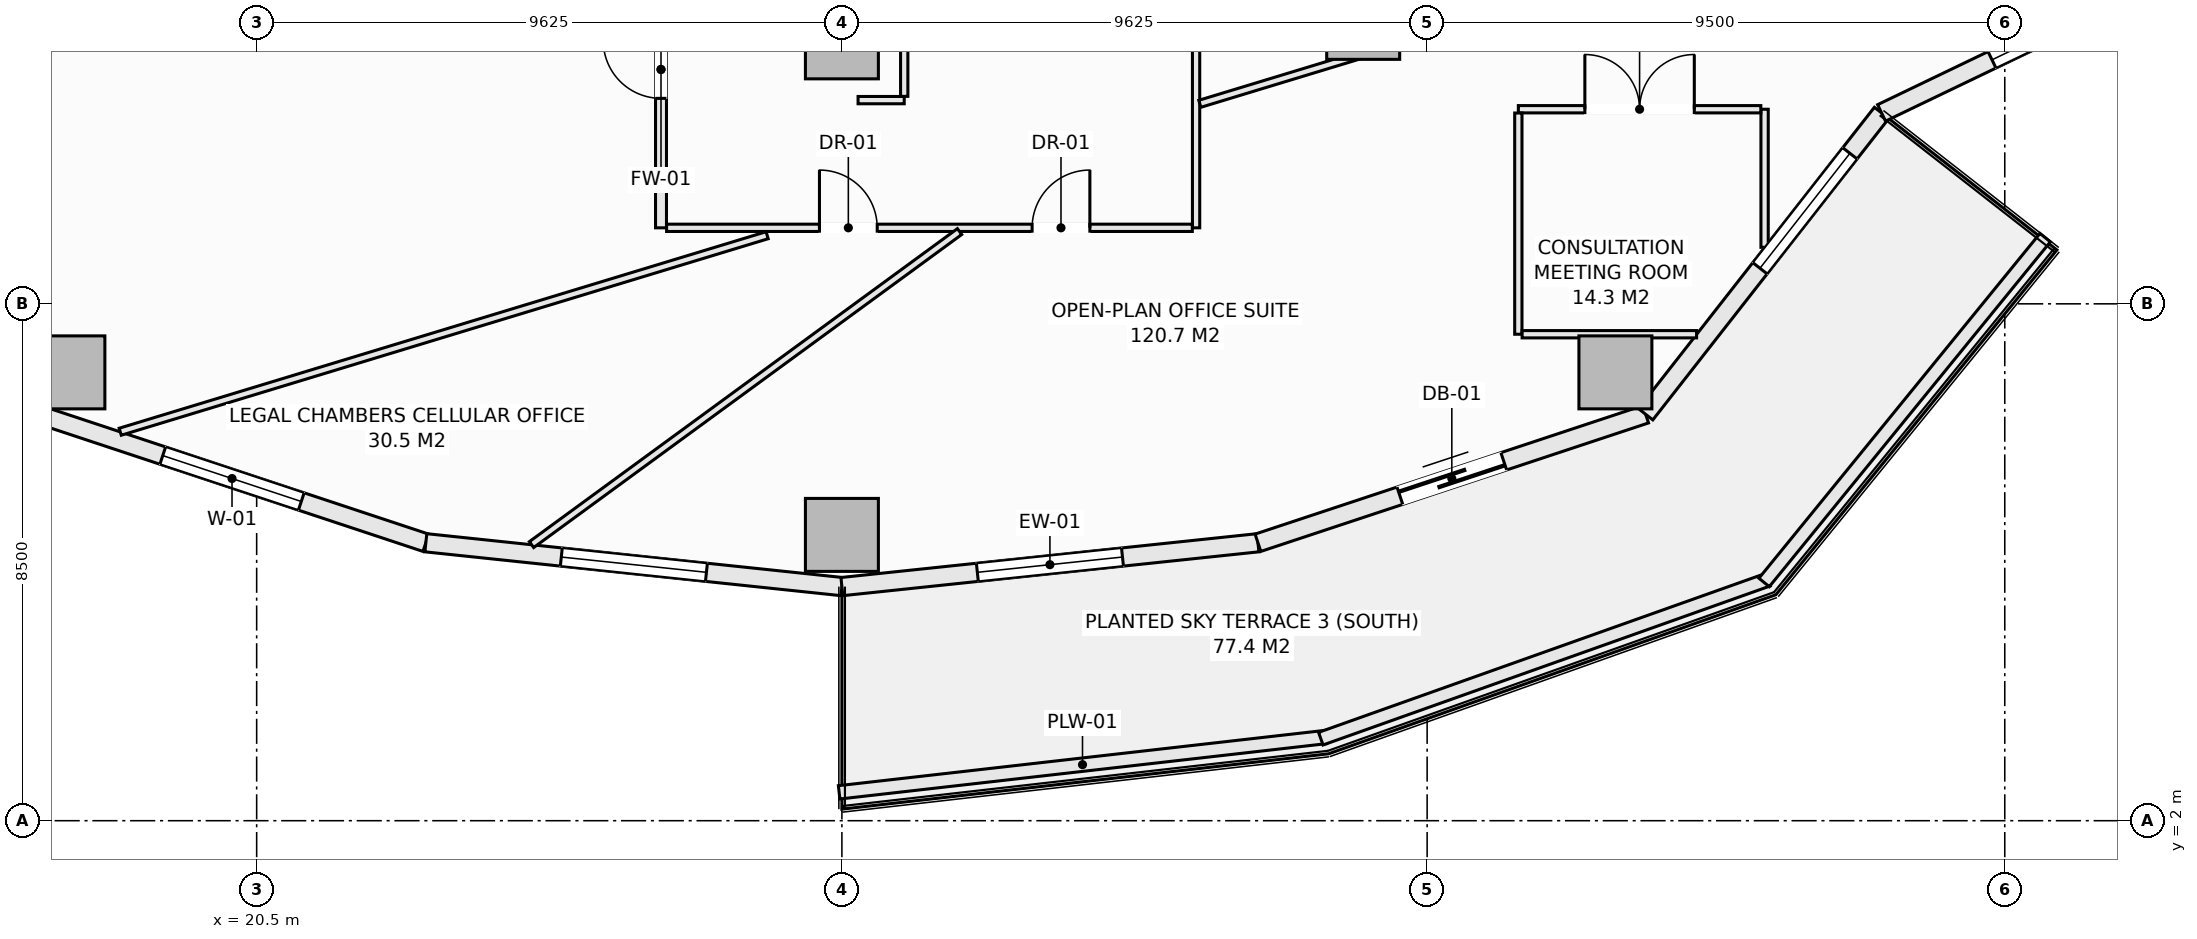
"""IFC4 building model, lengths in metres.
Left out: names, types, materials, properties, quantities, classifications, styles, units other than length and angle.
Written with IfcOpenShell. Run it as: python <this file> out.ifc"""

import sys

from ifc_helpers import new_model, si_unit, direction, frame, frame_2d, origin, origin_2d, place, context, subcontext, project, spatial, rectangle, extrude, element, fill, save


model = new_model("IFC4")
c1 = context("Model", 3, precision=1e-05, world=origin(), true_north=direction((0.0, 1.0)))
c2 = subcontext(c1, "Body", "Model", "MODEL_VIEW")
j1 = project(units=[si_unit("LENGTHUNIT", "METRE"), si_unit("PLANEANGLEUNIT", "RADIAN")], contexts=[c1])
p1 = place(None, origin())
s1 = spatial("IfcSite", under=j1, at=p1, CompositionType="ELEMENT")
p2 = place(p1, origin())
s2 = spatial("IfcBuilding", under=s1, at=p2, CompositionType="ELEMENT")
p3 = place(p2, frame((0.0, 0.0, 72.7)))
s3 = spatial("IfcBuildingStorey", under=s2, at=p3, CompositionType="ELEMENT", Elevation=72.7)
for number, where, z_axis, x_axis in (
    (1, (17.404, 9.373, -0.28), (0.0, 0.0, 1.0), (1.0, 0.0, 0.0)),
    (2, (30.125, 6.7, -0.28), (0.0, 0.0, 1.0), (1.0, 0.0, 0.0)),
    (3, (42.846, 9.373, -0.28), (0.0, 0.0, 1.0), (1.0, 0.0, 0.0)),
    (4, (30.125, 14.8, -0.28), (0.0, 0.0, 1.0), (1.0, 0.0, 0.0)),
    (5, (38.698, 15.121, -0.28), (0.0, 0.0, 1.0), (1.0, 0.0, 0.0)),
):
    element("IfcColumn", number, at=place(p3, frame(where, z_axis=z_axis, x_axis=x_axis)), inside=s3, PredefinedType="COLUMN", context=c2, shape_type="SweptSolid", body=[
        extrude(rectangle(XDim=1.2, YDim=1.2, at=origin_2d()), origin(), (0.0, 0.0, 1.0), 3.85),
    ])
p4 = place(p3, frame((16.906, 8.684, 0.0), z_axis=(0.0, 0.0, 1.0), x_axis=(0.949245153629, -0.314537181127, 0.0)))
e6 = element("IfcWall", 6, at=p4, inside=s3, PredefinedType="SOLIDWALL", context=c2, shape_type="SweptSolid", body=[
    extrude(rectangle(XDim=6.717, YDim=0.3, at=frame_2d((3.358, 0.0))), origin(), (0.0, 0.0, 1.0), 3.093),
])
p5 = place(p4, frame((2.159, 0.0, 0.85)))
e7 = element("IfcOpeningElement", 7, at=p5, cuts=e6, PredefinedType="OPENING", context=c2, shape_type="SweptSolid", body=[
    extrude(rectangle(XDim=2.4, YDim=1.9, at=frame_2d((1.2, 0.95))), frame((0.0, 0.16, 0.0), z_axis=(0.0, -1.0, 0.0), x_axis=(1.0, 0.0, 0.0)), (0.0, 0.0, 1.0), 0.32),
])
p6 = place(p3, frame((23.282, 6.571, 0.0), z_axis=(0.0, 0.0, 1.0), x_axis=(0.994498840295, -0.104747585419, 0.0)))
e8 = element("IfcWall", 8, at=p6, inside=s3, PredefinedType="SOLIDWALL", context=c2, shape_type="SweptSolid", body=[
    extrude(rectangle(XDim=6.88, YDim=0.3, at=frame_2d((3.44, 0.0))), origin(), (0.0, 0.0, 1.0), 3.093),
])
p7 = place(p6, frame((2.24, 0.0, 0.85)))
e9 = element("IfcOpeningElement", 9, at=p7, cuts=e8, PredefinedType="OPENING", context=c2, shape_type="SweptSolid", body=[
    extrude(rectangle(XDim=2.4, YDim=1.9, at=frame_2d((1.2, 0.95))), frame((0.0, 0.16, 0.0), z_axis=(0.0, -1.0, 0.0), x_axis=(1.0, 0.0, 0.0)), (0.0, 0.0, 1.0), 0.32),
])
p8 = place(p3, frame((30.125, 5.85, 0.0), z_axis=(0.0, 0.0, 1.0), x_axis=(0.994498840295, 0.104747585419, 0.0)))
e10 = element("IfcWall", 10, at=p8, inside=s3, PredefinedType="SOLIDWALL", context=c2, shape_type="SweptSolid", body=[
    extrude(rectangle(XDim=6.88, YDim=0.3, at=frame_2d((3.44, 0.0))), origin(), (0.0, 0.0, 1.0), 3.093),
])
p9 = place(p8, frame((2.24, 0.0, 0.85)))
e11 = element("IfcOpeningElement", 11, at=p9, cuts=e10, PredefinedType="OPENING", context=c2, shape_type="SweptSolid", body=[
    extrude(rectangle(XDim=2.4, YDim=1.9, at=frame_2d((1.2, 0.95))), frame((0.0, 0.16, 0.0), z_axis=(0.0, -1.0, 0.0), x_axis=(1.0, 0.0, 0.0)), (0.0, 0.0, 1.0), 0.32),
])
p10 = place(p3, frame((36.968, 6.571, 0.0), z_axis=(0.0, 0.0, 1.0), x_axis=(0.949245153629, 0.314537181127, 0.0)))
e12 = element("IfcWall", 12, at=p10, inside=s3, PredefinedType="SOLIDWALL", context=c2, shape_type="SweptSolid", body=[
    extrude(rectangle(XDim=6.717, YDim=0.3, at=frame_2d((3.358, 0.0))), origin(), (0.0, 0.0, 1.0), 3.093),
])
p11 = place(p10, frame((2.459, 0.0, 0.0)))
e13 = element("IfcOpeningElement", 13, at=p11, cuts=e12, PredefinedType="OPENING", context=c2, shape_type="SweptSolid", body=[
    extrude(rectangle(XDim=1.8, YDim=2.25, at=frame_2d((0.9, 1.125))), frame((0.0, 0.16, 0.0), z_axis=(0.0, -1.0, 0.0), x_axis=(1.0, 0.0, 0.0)), (0.0, 0.0, 1.0), 0.32),
])
p12 = place(p3, frame((43.344, 8.684, 0.0), z_axis=(0.0, 0.0, 1.0), x_axis=(0.616434798832, 0.78740595552, 0.0)))
e14 = element("IfcWall", 14, at=p12, inside=s3, PredefinedType="SOLIDWALL", context=c2, shape_type="SweptSolid", body=[
    extrude(rectangle(XDim=6.294, YDim=0.3, at=frame_2d((3.147, 0.0))), origin(), (0.0, 0.0, 1.0), 3.093),
])
p13 = place(p12, frame((3.05, 0.0, 0.85)))
e15 = element("IfcOpeningElement", 15, at=p13, cuts=e14, PredefinedType="OPENING", context=c2, shape_type="SweptSolid", body=[
    extrude(rectangle(XDim=2.4, YDim=1.9, at=frame_2d((1.2, 0.95))), frame((0.0, 0.16, 0.0), z_axis=(0.0, -1.0, 0.0), x_axis=(1.0, 0.0, 0.0)), (0.0, 0.0, 1.0), 0.32),
])
p14 = place(p3, frame((47.224, 13.64, 0.0), z_axis=(0.0, 0.0, 1.0), x_axis=(0.901354747727, 0.433081538224, 0.0)))
e16 = element("IfcWall", 16, at=p14, inside=s3, PredefinedType="SOLIDWALL", context=c2, shape_type="SweptSolid", body=[
    extrude(rectangle(XDim=6.431, YDim=0.3, at=frame_2d((3.215, 0.0))), origin(), (0.0, 0.0, 1.0), 3.093),
])
p15 = place(p14, frame((2.015, 0.0, 0.85)))
e17 = element("IfcOpeningElement", 17, at=p15, cuts=e16, PredefinedType="OPENING", context=c2, shape_type="SweptSolid", body=[
    extrude(rectangle(XDim=2.4, YDim=1.9, at=frame_2d((1.2, 0.95))), frame((0.0, 0.16, 0.0), z_axis=(0.0, -1.0, 0.0), x_axis=(1.0, 0.0, 0.0)), (0.0, 0.0, 1.0), 0.32),
])
p16 = place(p3, frame((30.08, 2.466, 0.0), z_axis=(0.0, 0.0, 1.0), x_axis=(0.993598144351, 0.112972242349, 0.0)))
e18 = element("IfcWall", 18, at=p16, inside=s3, PredefinedType="PARAPET", context=c2, shape_type="SweptSolid", body=[
    extrude(rectangle(XDim=8.056, YDim=0.22, at=frame_2d((4.028, 0.0))), origin(), (0.0, 0.0, 1.0), 0.52),
])
p17 = place(p3, frame((38.001, 3.349, 0.0), z_axis=(0.0, 0.0, 1.0), x_axis=(0.942203722205, 0.335040513764, 0.0)))
e19 = element("IfcWall", 19, at=p17, inside=s3, PredefinedType="PARAPET", context=c2, shape_type="SweptSolid", body=[
    extrude(rectangle(XDim=7.807, YDim=0.22, at=frame_2d((3.904, 0.0))), origin(), (0.0, 0.0, 1.0), 0.52),
])
p18 = place(p3, frame((45.292, 5.918, 0.0), z_axis=(0.0, 0.0, 1.0), x_axis=(0.631819273026, 0.775115737315, 0.0)))
e20 = element("IfcWall", 20, at=p18, inside=s3, PredefinedType="PARAPET", context=c2, shape_type="SweptSolid", body=[
    extrude(rectangle(XDim=7.316, YDim=0.22, at=frame_2d((3.658, 0.0))), origin(), (0.0, 0.0, 1.0), 0.52),
])
p19 = place(p3, frame((27.15, 11.75, 0.0), z_axis=(0.0, 0.0, 1.0), x_axis=(0.0, 1.0, 0.0)))
e21 = element("IfcWall", 21, at=p19, inside=s3, PredefinedType="SOLIDWALL", context=c2, shape_type="SweptSolid", body=[
    extrude(rectangle(XDim=5.208, YDim=0.18, at=frame_2d((2.604, 0.0))), origin(), (0.0, 0.0, 1.0), 3.57),
])
p20 = place(p19, frame((2.129, 0.0, 0.0)))
e22 = element("IfcOpeningElement", 22, at=p20, cuts=e21, PredefinedType="OPENING", context=c2, shape_type="SweptSolid", body=[
    extrude(rectangle(XDim=0.95, YDim=2.1, at=frame_2d((0.475, 1.05))), frame((0.0, 0.1, 0.0), z_axis=(0.0, -1.0, 0.0), x_axis=(1.0, 0.0, 0.0)), (0.0, 0.0, 1.0), 0.2),
])
p21 = place(p3, frame((35.95, 11.75, 0.0), z_axis=(0.0, 0.0, 1.0), x_axis=(0.0, 1.0, 0.0)))
e23 = element("IfcWall", 23, at=p21, inside=s3, PredefinedType="PARTITIONING", context=c2, shape_type="SweptSolid", body=[
    extrude(rectangle(XDim=3.838, YDim=0.12, at=frame_2d((1.919, 0.0))), origin(), (0.0, 0.0, 1.0), 3.57),
])
p22 = place(p3, frame((27.242, 11.75, 0.0), z_axis=(0.0, 0.0, 1.0), x_axis=(1.0, 0.0, 0.0)))
e24 = element("IfcWall", 24, at=p22, inside=s3, PredefinedType="PARTITIONING", context=c2, shape_type="SweptSolid", body=[
    extrude(rectangle(XDim=8.646, YDim=0.12, at=frame_2d((4.323, 0.0))), origin(), (0.0, 0.0, 1.0), 3.57),
])
p23 = place(p22, frame((2.514, 0.0, 0.0)))
e25 = element("IfcOpeningElement", 25, at=p23, cuts=e24, PredefinedType="OPENING", context=c2, shape_type="SweptSolid", body=[
    extrude(rectangle(XDim=0.95, YDim=2.1, at=frame_2d((0.475, 1.05))), frame((0.0, 0.07, 0.0), z_axis=(0.0, -1.0, 0.0), x_axis=(1.0, 0.0, 0.0)), (0.0, 0.0, 1.0), 0.14),
])
p24 = place(p22, frame((6.011, 0.0, 0.0)))
e26 = element("IfcOpeningElement", 26, at=p24, cuts=e24, PredefinedType="OPENING", context=c2, shape_type="SweptSolid", body=[
    extrude(rectangle(XDim=0.95, YDim=2.1, at=frame_2d((0.475, 1.05))), frame((0.0, 0.07, 0.0), z_axis=(0.0, -1.0, 0.0), x_axis=(1.0, 0.0, 0.0)), (0.0, 0.0, 1.0), 0.14),
])
p25 = place(p3, frame((30.391, 13.85, 0.0), z_axis=(0.0, 0.0, 1.0), x_axis=(1.0, 0.0, 0.0)))
e27 = element("IfcWall", 27, at=p25, inside=s3, PredefinedType="PARTITIONING", context=c2, shape_type="SweptSolid", body=[
    extrude(rectangle(XDim=0.759, YDim=0.12, at=frame_2d((0.379, 0.0))), origin(), (0.0, 0.0, 1.0), 3.57),
])
p26 = place(p3, frame((31.15, 13.912, 0.0), z_axis=(0.0, 0.0, 1.0), x_axis=(0.0, 1.0, 0.0)))
e28 = element("IfcWall", 28, at=p26, inside=s3, PredefinedType="PARTITIONING", context=c2, shape_type="SweptSolid", body=[
    extrude(rectangle(XDim=1.676, YDim=0.12, at=frame_2d((0.838, 0.0))), origin(), (0.0, 0.0, 1.0), 3.57),
])
p27 = place(p3, frame((18.256, 8.396, 0.0), z_axis=(0.0, 0.0, 1.0), x_axis=(0.9568399174, 0.290615506246, 0.0)))
e29 = element("IfcWall", 29, at=p27, inside=s3, PredefinedType="PARTITIONING", context=c2, shape_type="SweptSolid", body=[
    extrude(rectangle(XDim=11.119, YDim=0.12, at=frame_2d((5.56, 0.0))), origin(), (0.0, 0.0, 1.0), 3.093),
])
p28 = place(p3, frame((36.012, 13.79, 0.0), z_axis=(0.0, 0.0, 1.0), x_axis=(0.95683920317, 0.290617857809, 0.0)))
e30 = element("IfcWall", 30, at=p28, inside=s3, PredefinedType="PARTITIONING", context=c2, shape_type="SweptSolid", body=[
    extrude(rectangle(XDim=17.314, YDim=0.12, at=frame_2d((8.657, 0.0))), origin(), (0.0, 0.0, 1.0), 3.57),
])
p29 = place(p3, frame((25.021, 6.541, 0.0), z_axis=(0.0, 0.0, 1.0), x_axis=(0.80721771605, 0.590253808878, 0.0)))
e31 = element("IfcWall", 31, at=p29, inside=s3, PredefinedType="PARTITIONING", context=c2, shape_type="SweptSolid", body=[
    extrude(rectangle(XDim=8.721, YDim=0.12, at=frame_2d((4.36, 0.0))), origin(), (0.0, 0.0, 1.0), 3.57),
])
p30 = place(p3, frame((45.3, 11.429, 0.0), z_axis=(0.0, 0.0, 1.0), x_axis=(0.0, 1.0, 0.0)))
e32 = element("IfcWall", 32, at=p30, inside=s3, PredefinedType="PARTITIONING", context=c2, shape_type="SweptSolid", body=[
    extrude(rectangle(XDim=2.271, YDim=0.12, at=frame_2d((1.135, 0.0))), origin(), (0.0, 0.0, 1.0), 3.57),
])
p31 = place(p3, frame((41.25, 13.7, 0.0), z_axis=(0.0, 0.0, 1.0), x_axis=(1.0, 0.0, 0.0)))
e33 = element("IfcWall", 33, at=p31, inside=s3, PredefinedType="PARTITIONING", context=c2, shape_type="SweptSolid", body=[
    extrude(rectangle(XDim=3.988, YDim=0.12, at=frame_2d((1.994, 0.0))), origin(), (0.0, 0.0, 1.0), 3.57),
])
p32 = place(p31, frame((1.094, 0.0, 0.0)))
e34 = element("IfcOpeningElement", 34, at=p32, cuts=e33, PredefinedType="OPENING", context=c2, shape_type="SweptSolid", body=[
    extrude(rectangle(XDim=1.8, YDim=2.3, at=frame_2d((0.9, 1.15))), frame((0.0, 0.07, 0.0), z_axis=(0.0, -1.0, 0.0), x_axis=(1.0, 0.0, 0.0)), (0.0, 0.0, 1.0), 0.14),
])
p33 = place(p3, frame((41.25, 10.0, 0.0), z_axis=(0.0, 0.0, 1.0), x_axis=(0.0, 1.0, 0.0)))
e35 = element("IfcWall", 35, at=p33, inside=s3, PredefinedType="PARTITIONING", context=c2, shape_type="SweptSolid", body=[
    extrude(rectangle(XDim=3.638, YDim=0.12, at=frame_2d((1.819, 0.0))), origin(), (0.0, 0.0, 1.0), 2.934),
])
p34 = place(p3, frame((41.312, 10.0, 0.0), z_axis=(0.0, 0.0, 1.0), x_axis=(1.0, 0.0, 0.0)))
e36 = element("IfcWall", 36, at=p34, inside=s3, PredefinedType="PARTITIONING", context=c2, shape_type="SweptSolid", body=[
    extrude(rectangle(XDim=2.869, YDim=0.12, at=frame_2d((1.435, 0.0))), origin(), (0.0, 0.0, 1.0), 3.093),
])
p35 = place(p5, origin())
e37 = element("IfcWindow", 37, at=p35, inside=s3, PartitioningType="SINGLE_PANEL", PredefinedType="WINDOW", context=c2, shape_type="SweptSolid", body=[
    extrude(rectangle(XDim=2.4, YDim=1.9, at=frame_2d((1.2, 0.95))), frame((0.0, 0.03, 0.0), z_axis=(0.0, -1.0, 0.0), x_axis=(1.0, 0.0, 0.0)), (0.0, 0.0, 1.0), 0.06),
])
fill(e7, e37)
p36 = place(p7, origin())
e38 = element("IfcWindow", 38, at=p36, inside=s3, PartitioningType="SINGLE_PANEL", PredefinedType="WINDOW", context=c2, shape_type="SweptSolid", body=[
    extrude(rectangle(XDim=2.4, YDim=1.9, at=frame_2d((1.2, 0.95))), frame((0.0, 0.03, 0.0), z_axis=(0.0, -1.0, 0.0), x_axis=(1.0, 0.0, 0.0)), (0.0, 0.0, 1.0), 0.06),
])
fill(e9, e38)
p37 = place(p9, origin())
e39 = element("IfcWindow", 39, at=p37, inside=s3, PartitioningType="SINGLE_PANEL", PredefinedType="WINDOW", context=c2, shape_type="SweptSolid", body=[
    extrude(rectangle(XDim=2.4, YDim=1.9, at=frame_2d((1.2, 0.95))), frame((0.0, 0.03, 0.0), z_axis=(0.0, -1.0, 0.0), x_axis=(1.0, 0.0, 0.0)), (0.0, 0.0, 1.0), 0.06),
])
fill(e11, e39)
p38 = place(p11, frame((1.8, 0.0, 0.0), z_axis=(0.0, 0.0, 1.0), x_axis=(-1.0, 0.0, 0.0)))
e40 = element("IfcDoor", 40, at=p38, inside=s3, OperationType="SLIDING_TO_LEFT", PredefinedType="DOOR", context=c2, shape_type="SweptSolid", body=[
    extrude(rectangle(XDim=1.8, YDim=2.25, at=frame_2d((0.9, 1.125))), frame((0.0, 0.025, 0.0), z_axis=(0.0, -1.0, 0.0), x_axis=(1.0, 0.0, 0.0)), (0.0, 0.0, 1.0), 0.05),
])
fill(e13, e40)
p39 = place(p13, origin())
e41 = element("IfcWindow", 41, at=p39, inside=s3, PartitioningType="SINGLE_PANEL", PredefinedType="WINDOW", context=c2, shape_type="SweptSolid", body=[
    extrude(rectangle(XDim=2.4, YDim=1.9, at=frame_2d((1.2, 0.95))), frame((0.0, 0.03, 0.0), z_axis=(0.0, -1.0, 0.0), x_axis=(1.0, 0.0, 0.0)), (0.0, 0.0, 1.0), 0.06),
])
fill(e15, e41)
p40 = place(p15, origin())
e42 = element("IfcWindow", 42, at=p40, inside=s3, PartitioningType="SINGLE_PANEL", PredefinedType="WINDOW", context=c2, shape_type="SweptSolid", body=[
    extrude(rectangle(XDim=2.4, YDim=1.9, at=frame_2d((1.2, 0.95))), frame((0.0, 0.03, 0.0), z_axis=(0.0, -1.0, 0.0), x_axis=(1.0, 0.0, 0.0)), (0.0, 0.0, 1.0), 0.06),
])
fill(e17, e42)
p41 = place(p20, origin())
e43 = element("IfcDoor", 43, at=p41, inside=s3, OperationType="SINGLE_SWING_RIGHT", PredefinedType="DOOR", context=c2, shape_type="SweptSolid", body=[
    extrude(rectangle(XDim=0.95, YDim=2.1, at=frame_2d((0.475, 1.05))), frame((0.0, 0.025, 0.0), z_axis=(0.0, -1.0, 0.0), x_axis=(1.0, 0.0, 0.0)), (0.0, 0.0, 1.0), 0.05),
])
fill(e22, e43)
p42 = place(p23, origin())
e44 = element("IfcDoor", 44, at=p42, inside=s3, OperationType="SINGLE_SWING_LEFT", PredefinedType="DOOR", context=c2, shape_type="SweptSolid", body=[
    extrude(rectangle(XDim=0.95, YDim=2.1, at=frame_2d((0.475, 1.05))), frame((0.0, 0.025, 0.0), z_axis=(0.0, -1.0, 0.0), x_axis=(1.0, 0.0, 0.0)), (0.0, 0.0, 1.0), 0.05),
])
fill(e25, e44)
p43 = place(p24, origin())
e45 = element("IfcDoor", 45, at=p43, inside=s3, OperationType="SINGLE_SWING_RIGHT", PredefinedType="DOOR", context=c2, shape_type="SweptSolid", body=[
    extrude(rectangle(XDim=0.95, YDim=2.1, at=frame_2d((0.475, 1.05))), frame((0.0, 0.025, 0.0), z_axis=(0.0, -1.0, 0.0), x_axis=(1.0, 0.0, 0.0)), (0.0, 0.0, 1.0), 0.05),
])
fill(e26, e45)
p44 = place(p32, origin())
e46 = element("IfcDoor", 46, at=p44, inside=s3, OperationType="DOUBLE_DOOR_SINGLE_SWING", PredefinedType="DOOR", context=c2, shape_type="SweptSolid", body=[
    extrude(rectangle(XDim=1.8, YDim=2.3, at=frame_2d((0.9, 1.15))), frame((0.0, 0.025, 0.0), z_axis=(0.0, -1.0, 0.0), x_axis=(1.0, 0.0, 0.0)), (0.0, 0.0, 1.0), 0.05),
])
fill(e34, e46)
save(model, sys.argv[1])
